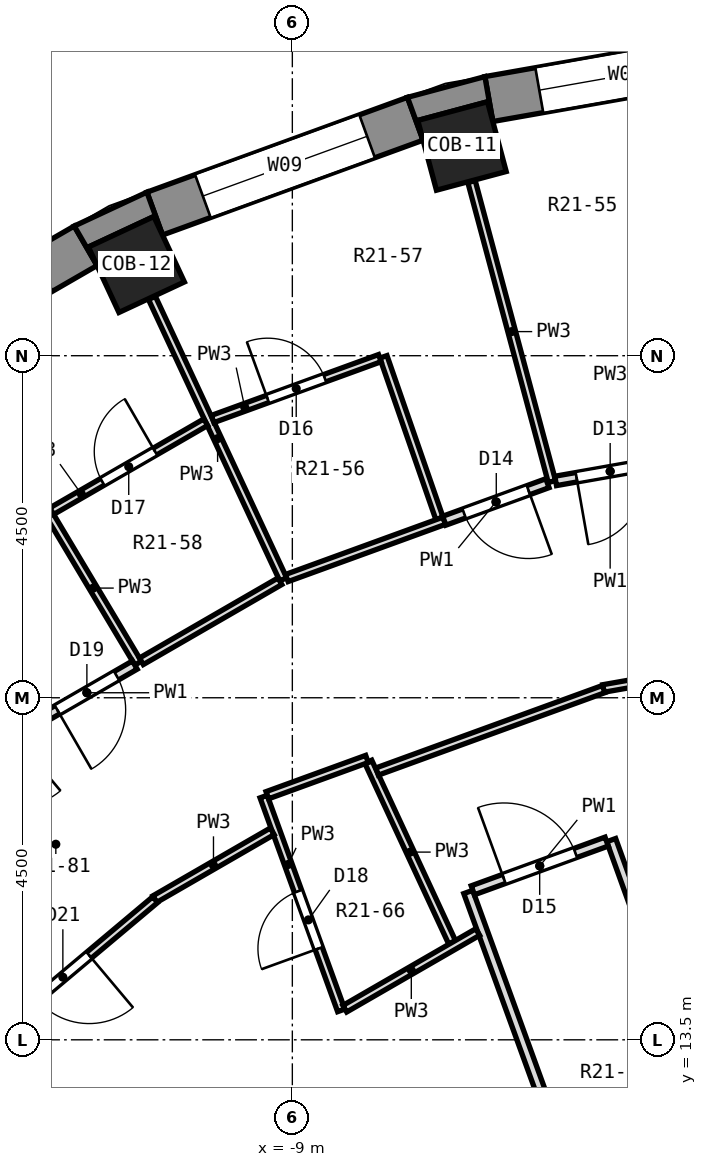
"""IFC4 building model, lengths in metres.
Left out: names, types, materials, properties, quantities, classifications, styles, units other than length and angle.
Written with IfcOpenShell. Run it as: python <this file> out.ifc"""

import sys

from ifc_helpers import new_model, si_unit, direction, frame, frame_2d, origin, origin_2d, place, context, subcontext, project, spatial, polyline, rectangle, outline, extrude, element, fill, save


model = new_model("IFC4")
c1 = context("Model", 3, precision=1e-05, world=origin(), true_north=direction((0.0, 1.0)))
c2 = subcontext(c1, "Body", "Model", "MODEL_VIEW")
j1 = project(units=[si_unit("LENGTHUNIT", "METRE"), si_unit("PLANEANGLEUNIT", "RADIAN")], contexts=[c1])
p1 = place(None, origin())
s1 = spatial("IfcSite", under=j1, at=p1, CompositionType="ELEMENT")
p2 = place(p1, origin())
s2 = spatial("IfcBuilding", under=s1, at=p2, CompositionType="ELEMENT")
p3 = place(p2, frame((0.0, 0.0, 131.5)))
s3 = spatial("IfcBuildingStorey", under=s2, at=p3, CompositionType="ELEMENT", Elevation=131.5)
for number, where, z_axis, x_axis in (
    (1, (-6.768, 25.259, 0.0), (0.0, 0.0, 1.0), (-0.259, 0.966, 0.0)),
    (2, (-11.052, 23.7, 0.0), (0.0, 0.0, 1.0), (-0.423, 0.906, 0.0)),
):
    element("IfcColumn", number, at=place(p3, frame(where, z_axis=z_axis, x_axis=x_axis)), inside=s3, PredefinedType="COLUMN", context=c2, shape_type="SweptSolid", body=[
        extrude(rectangle(XDim=0.95, YDim=0.95, at=origin_2d()), origin(), (0.0, 0.0, 1.0), 3.3),
    ])
p4 = place(p3, frame((-2.822, 26.51, 0.0), z_axis=(0.0, 0.0, 1.0), x_axis=(-0.984803764455, -0.173670796382, 0.0)))
e3 = element("IfcWall", 3, at=p4, inside=s3, PredefinedType="SOLIDWALL", context=c2, shape_type="SweptSolid", body=[
    extrude(rectangle(XDim=3.648, YDim=0.6, at=frame_2d((1.824, 0.0))), origin(), (0.0, 0.0, 1.0), 2.8),
])
p5 = place(p4, frame((0.674, 0.0, 0.9)))
e4 = element("IfcOpeningElement", 4, at=p5, cuts=e3, PredefinedType="OPENING", context=c2, shape_type="SweptSolid", body=[
    extrude(rectangle(XDim=2.3, YDim=1.8, at=frame_2d((1.15, 0.9))), frame((0.0, 0.312, 0.0), z_axis=(0.0, -1.0, 0.0), x_axis=(1.0, 0.0, 0.0)), (0.0, 0.0, 1.0), 0.624),
])
p6 = place(p3, frame((-7.383, 25.617, 0.0), z_axis=(0.0, 0.0, 1.0), x_axis=(-0.939703505393, -0.341990236633, 0.0)))
e5 = element("IfcWall", 5, at=p6, inside=s3, PredefinedType="SOLIDWALL", context=c2, shape_type="SweptSolid", body=[
    extrude(rectangle(XDim=3.648, YDim=0.6, at=frame_2d((1.824, 0.0))), origin(), (0.0, 0.0, 1.0), 2.8),
])
p7 = place(p6, frame((0.674, 0.0, 0.9)))
e6 = element("IfcOpeningElement", 6, at=p7, cuts=e5, PredefinedType="OPENING", context=c2, shape_type="SweptSolid", body=[
    extrude(rectangle(XDim=2.3, YDim=1.8, at=frame_2d((1.15, 0.9))), frame((0.0, 0.312, 0.0), z_axis=(0.0, -1.0, 0.0), x_axis=(1.0, 0.0, 0.0)), (0.0, 0.0, 1.0), 0.624),
])
p8 = place(p3, frame((-11.719, 23.946, 0.0), z_axis=(0.0, 0.0, 1.0), x_axis=(-0.866051847062, -0.499954196102, 0.0)))
e7 = element("IfcWall", 7, at=p8, inside=s3, PredefinedType="SOLIDWALL", context=c2, shape_type="SweptSolid", body=[
    extrude(rectangle(XDim=3.648, YDim=0.6, at=frame_2d((1.824, 0.0))), origin(), (0.0, 0.0, 1.0), 2.8),
])
p9 = place(p8, frame((0.674, 0.0, 0.9)))
e8 = element("IfcOpeningElement", 8, at=p9, cuts=e7, PredefinedType="OPENING", context=c2, shape_type="SweptSolid", body=[
    extrude(rectangle(XDim=2.3, YDim=1.8, at=frame_2d((1.15, 0.9))), frame((0.0, 0.312, 0.0), z_axis=(0.0, -1.0, 0.0), x_axis=(1.0, 0.0, 0.0)), (0.0, 0.0, 1.0), 0.624),
])
p10 = place(p3, origin())
e9 = element("IfcWall", 9, at=p10, inside=s3, PredefinedType="SOLIDWALL", context=c2, shape_type="SweptSolid", body=[
    extrude(outline(polyline([(-6.467, 26.172), (-7.486, 25.899), (-7.28, 25.335), (-7.35, 25.595), (-6.432, 25.841), (-6.363, 25.581), (-6.467, 26.172)])), origin(), (0.0, 0.0, 1.0), 2.8),
])
p11 = place(p3, origin())
e10 = element("IfcWall", 10, at=p11, inside=s3, PredefinedType="SOLIDWALL", context=c2, shape_type="SweptSolid", body=[
    extrude(outline(polyline([(-10.913, 24.651), (-11.869, 24.206), (-11.569, 23.686), (-11.683, 23.93), (-10.822, 24.331), (-10.708, 24.087), (-10.913, 24.651)])), origin(), (0.0, 0.0, 1.0), 2.8),
])
p12 = place(p3, frame((-6.642, 24.791, 0.0), z_axis=(0.0, 0.0, 1.0), x_axis=(0.258796817064, -0.965931782, 0.0)))
e11 = element("IfcWall", 11, at=p12, inside=s3, PredefinedType="PARTITIONING", context=c2, shape_type="SweptSolid", body=[
    extrude(rectangle(XDim=4.086, YDim=0.1, at=frame_2d((2.043, 0.0))), origin(), (0.0, 0.0, 1.0), 2.8),
])
p13 = place(p3, frame((-7.802, 22.485, 0.0), z_axis=(0.0, 0.0, 1.0), x_axis=(0.327758868129, -0.944761411343, 0.0)))
e12 = element("IfcWall", 12, at=p13, inside=s3, PredefinedType="PARTITIONING", context=c2, shape_type="SweptSolid", body=[
    extrude(rectangle(XDim=2.25, YDim=0.1, at=frame_2d((1.125, 0.0))), origin(), (0.0, 0.0, 1.0), 2.8),
])
p14 = place(p3, frame((-4.805, 16.127, 0.0), z_axis=(0.0, 0.0, 1.0), x_axis=(0.339327115449, -0.940668437188, 0.0)))
e13 = element("IfcWall", 13, at=p14, inside=s3, PredefinedType="PARTITIONING", context=c2, shape_type="SweptSolid", body=[
    extrude(rectangle(XDim=5.804, YDim=0.125, at=frame_2d((2.902, 0.0))), origin(), (0.0, 0.0, 1.0), 2.8),
])
p15 = place(p3, frame((-9.378, 16.7, 0.0), z_axis=(0.0, 0.0, 1.0), x_axis=(0.341009323841, -0.940059913545, 0.0)))
e14 = element("IfcWall", 14, at=p15, inside=s3, PredefinedType="PARTITIONING", context=c2, shape_type="SweptSolid", body=[
    extrude(rectangle(XDim=2.993, YDim=0.1, at=frame_2d((1.496, 0.0))), origin(), (0.0, 0.0, 1.0), 2.8),
])
p16 = place(p15, frame((1.326, 0.0, 0.0)))
e15 = element("IfcOpeningElement", 15, at=p16, cuts=e14, PredefinedType="OPENING", context=c2, shape_type="SweptSolid", body=[
    extrude(rectangle(XDim=0.8, YDim=2.1, at=frame_2d((0.4, 1.05))), frame((0.0, 0.062, 0.0), z_axis=(0.0, -1.0, 0.0), x_axis=(1.0, 0.0, 0.0)), (0.0, 0.0, 1.0), 0.124),
])
p17 = place(p3, frame((-6.686, 15.445, 0.0), z_axis=(0.0, 0.0, 1.0), x_axis=(0.341435936204, -0.939905049177, 0.0)))
e16 = element("IfcWall", 16, at=p17, inside=s3, PredefinedType="PARTITIONING", context=c2, shape_type="SweptSolid", body=[
    extrude(rectangle(XDim=5.745, YDim=0.125, at=frame_2d((2.872, 0.0))), origin(), (0.0, 0.0, 1.0), 2.8),
])
p18 = place(p3, frame((-8.001, 17.158, 0.0), z_axis=(0.0, 0.0, 1.0), x_axis=(0.420966177441, -0.907076334964, 0.0)))
e17 = element("IfcWall", 17, at=p18, inside=s3, PredefinedType="PARTITIONING", context=c2, shape_type="SweptSolid", body=[
    extrude(rectangle(XDim=2.62, YDim=0.1, at=frame_2d((1.31, 0.0))), origin(), (0.0, 0.0, 1.0), 2.8),
])
p19 = place(p3, frame((-10.847, 23.26, 0.0), z_axis=(0.0, 0.0, 1.0), x_axis=(0.422784035137, -0.906230467173, 0.0)))
e18 = element("IfcWall", 18, at=p19, inside=s3, PredefinedType="PARTITIONING", context=c2, shape_type="SweptSolid", body=[
    extrude(rectangle(XDim=4.085, YDim=0.1, at=frame_2d((2.042, 0.0))), origin(), (0.0, 0.0, 1.0), 2.8),
])
p20 = place(p3, frame((-12.209, 20.43, 0.0), z_axis=(0.0, 0.0, 1.0), x_axis=(0.512902991174, -0.858446574718, 0.0)))
e19 = element("IfcWall", 19, at=p20, inside=s3, PredefinedType="PARTITIONING", context=c2, shape_type="SweptSolid", body=[
    extrude(rectangle(XDim=2.301, YDim=0.1, at=frame_2d((1.15, 0.0))), origin(), (0.0, 0.0, 1.0), 2.8),
])
p21 = place(p3, frame((-13.237, 13.237, 0.0), z_axis=(0.0, 0.0, 1.0), x_axis=(0.707106781187, -0.707106781187, 0.0)))
e20 = element("IfcWall", 20, at=p21, inside=s3, PredefinedType="PARTITIONING", context=c2, shape_type="SweptSolid", body=[
    extrude(rectangle(XDim=7.615, YDim=0.125, at=frame_2d((3.807, 0.0))), origin(), (0.0, 0.0, 1.0), 2.8),
])
p22 = place(p3, frame((-4.908, 18.122, 0.0), z_axis=(0.0, 0.0, 1.0), x_axis=(0.984801579175, 0.1736831876, 0.0)))
e21 = element("IfcWall", 21, at=p22, inside=s3, PredefinedType="PARTITIONING", context=c2, shape_type="SweptSolid", body=[
    extrude(rectangle(XDim=3.272, YDim=0.1, at=frame_2d((1.636, 0.0))), origin(), (0.0, 0.0, 1.0), 2.8),
])
p23 = place(p3, frame((-5.536, 20.853, 0.0), z_axis=(0.0, 0.0, 1.0), x_axis=(0.984862774054, 0.173335848233, 0.0)))
e22 = element("IfcWall", 22, at=p23, inside=s3, PredefinedType="PARTITIONING", context=c2, shape_type="SweptSolid", body=[
    extrude(rectangle(XDim=1.456, YDim=0.125, at=frame_2d((0.728, 0.0))), origin(), (0.0, 0.0, 1.0), 2.8),
])
p24 = place(p23, frame((0.278, 0.0, 0.0)))
e23 = element("IfcOpeningElement", 23, at=p24, cuts=e22, PredefinedType="OPENING", context=c2, shape_type="SweptSolid", body=[
    extrude(rectangle(XDim=0.9, YDim=2.1, at=frame_2d((0.45, 1.05))), frame((0.0, 0.074, 0.0), z_axis=(0.0, -1.0, 0.0), x_axis=(1.0, 0.0, 0.0)), (0.0, 0.0, 1.0), 0.149),
])
p25 = place(p3, frame((-6.625, 15.467, 0.0), z_axis=(0.0, 0.0, 1.0), x_axis=(0.939717302556, 0.341952323105, 0.0)))
e24 = element("IfcWall", 24, at=p25, inside=s3, PredefinedType="PARTITIONING", context=c2, shape_type="SweptSolid", body=[
    extrude(rectangle(XDim=1.874, YDim=0.125, at=frame_2d((0.937, 0.0))), origin(), (0.0, 0.0, 1.0), 2.8),
])
p26 = place(p25, frame((0.436, 0.0, 0.0)))
e25 = element("IfcOpeningElement", 25, at=p26, cuts=e24, PredefinedType="OPENING", context=c2, shape_type="SweptSolid", body=[
    extrude(rectangle(XDim=1.0, YDim=2.1, at=frame_2d((0.5, 1.05))), frame((0.0, 0.074, 0.0), z_axis=(0.0, -1.0, 0.0), x_axis=(1.0, 0.0, 0.0)), (0.0, 0.0, 1.0), 0.149),
])
p27 = place(p3, frame((-7.885, 17.029, 0.0), z_axis=(0.0, 0.0, 1.0), x_axis=(0.939658489008, 0.342113905059, 0.0)))
e26 = element("IfcWall", 26, at=p27, inside=s3, PredefinedType="PARTITIONING", context=c2, shape_type="SweptSolid", body=[
    extrude(rectangle(XDim=3.171, YDim=0.1, at=frame_2d((1.586, 0.0))), origin(), (0.0, 0.0, 1.0), 2.8),
])
p28 = place(p3, frame((-9.329, 16.718, 0.0), z_axis=(0.0, 0.0, 1.0), x_axis=(0.939665632091, 0.342094285054, 0.0)))
e27 = element("IfcWall", 27, at=p28, inside=s3, PredefinedType="PARTITIONING", context=c2, shape_type="SweptSolid", body=[
    extrude(rectangle(XDim=1.395, YDim=0.1, at=frame_2d((0.698, 0.0))), origin(), (0.0, 0.0, 1.0), 2.8),
])
p29 = place(p3, frame((-9.073, 19.575, 0.0), z_axis=(0.0, 0.0, 1.0), x_axis=(0.939728749343, 0.341920864613, 0.0)))
e28 = element("IfcWall", 28, at=p29, inside=s3, PredefinedType="PARTITIONING", context=c2, shape_type="SweptSolid", body=[
    extrude(rectangle(XDim=2.205, YDim=0.1, at=frame_2d((1.103, 0.0))), origin(), (0.0, 0.0, 1.0), 2.8),
])
p30 = place(p3, frame((-7.001, 20.329, 0.0), z_axis=(0.0, 0.0, 1.0), x_axis=(0.939763804893, 0.341824503237, 0.0)))
e29 = element("IfcWall", 29, at=p30, inside=s3, PredefinedType="PARTITIONING", context=c2, shape_type="SweptSolid", body=[
    extrude(rectangle(XDim=1.444, YDim=0.125, at=frame_2d((0.722, 0.0))), origin(), (0.0, 0.0, 1.0), 2.8),
])
p31 = place(p30, frame((0.278, 0.0, 0.0)))
e30 = element("IfcOpeningElement", 30, at=p31, cuts=e29, PredefinedType="OPENING", context=c2, shape_type="SweptSolid", body=[
    extrude(rectangle(XDim=0.9, YDim=2.1, at=frame_2d((0.45, 1.05))), frame((0.0, 0.074, 0.0), z_axis=(0.0, -1.0, 0.0), x_axis=(1.0, 0.0, 0.0)), (0.0, 0.0, 1.0), 0.149),
])
p32 = place(p3, frame((-10.049, 21.667, 0.0), z_axis=(0.0, 0.0, 1.0), x_axis=(0.939662448837, 0.342103028699, 0.0)))
e31 = element("IfcWall", 31, at=p32, inside=s3, PredefinedType="PARTITIONING", context=c2, shape_type="SweptSolid", body=[
    extrude(rectangle(XDim=2.342, YDim=0.1, at=frame_2d((1.171, 0.0))), origin(), (0.0, 0.0, 1.0), 2.8),
])
p33 = place(p32, frame((0.771, 0.0, 0.0)))
e32 = element("IfcOpeningElement", 32, at=p33, cuts=e31, PredefinedType="OPENING", context=c2, shape_type="SweptSolid", body=[
    extrude(rectangle(XDim=0.8, YDim=2.1, at=frame_2d((0.4, 1.05))), frame((0.0, 0.062, 0.0), z_axis=(0.0, -1.0, 0.0), x_axis=(1.0, 0.0, 0.0)), (0.0, 0.0, 1.0), 0.124),
])
p34 = place(p3, frame((-8.31, 13.909, 0.0), z_axis=(0.0, 0.0, 1.0), x_axis=(0.866137275136, 0.499806183056, 0.0)))
e33 = element("IfcWall", 33, at=p34, inside=s3, PredefinedType="PARTITIONING", context=c2, shape_type="SweptSolid", body=[
    extrude(rectangle(XDim=2.019, YDim=0.1, at=frame_2d((1.01, 0.0))), origin(), (0.0, 0.0, 1.0), 2.8),
])
p35 = place(p3, frame((-10.81, 15.351, 0.0), z_axis=(0.0, 0.0, 1.0), x_axis=(0.866037519928, 0.499979013637, 0.0)))
e34 = element("IfcWall", 34, at=p35, inside=s3, PredefinedType="PARTITIONING", context=c2, shape_type="SweptSolid", body=[
    extrude(rectangle(XDim=1.785, YDim=0.1, at=frame_2d((0.892, 0.0))), origin(), (0.0, 0.0, 1.0), 2.8),
])
p36 = place(p3, frame((-10.986, 18.48, 0.0), z_axis=(0.0, 0.0, 1.0), x_axis=(0.865841622723, 0.50031818312, 0.0)))
e35 = element("IfcWall", 35, at=p36, inside=s3, PredefinedType="PARTITIONING", context=c2, shape_type="SweptSolid", body=[
    extrude(rectangle(XDim=2.105, YDim=0.1, at=frame_2d((1.052, 0.0))), origin(), (0.0, 0.0, 1.0), 2.8),
])
p37 = place(p3, frame((-12.334, 17.702, 0.0), z_axis=(0.0, 0.0, 1.0), x_axis=(0.866110229381, 0.499853048967, 0.0)))
e36 = element("IfcWall", 36, at=p37, inside=s3, PredefinedType="PARTITIONING", context=c2, shape_type="SweptSolid", body=[
    extrude(rectangle(XDim=1.457, YDim=0.125, at=frame_2d((0.728, 0.0))), origin(), (0.0, 0.0, 1.0), 2.8),
])
p38 = place(p37, frame((0.278, 0.0, 0.0)))
e37 = element("IfcOpeningElement", 37, at=p38, cuts=e36, PredefinedType="OPENING", context=c2, shape_type="SweptSolid", body=[
    extrude(rectangle(XDim=0.9, YDim=2.1, at=frame_2d((0.45, 1.05))), frame((0.0, 0.074, 0.0), z_axis=(0.0, -1.0, 0.0), x_axis=(1.0, 0.0, 0.0)), (0.0, 0.0, 1.0), 0.149),
])
p39 = place(p3, frame((-12.166, 20.455, 0.0), z_axis=(0.0, 0.0, 1.0), x_axis=(0.866025730634, 0.499999433879, 0.0)))
e38 = element("IfcWall", 38, at=p39, inside=s3, PredefinedType="PARTITIONING", context=c2, shape_type="SweptSolid", body=[
    extrude(rectangle(XDim=2.34, YDim=0.1, at=frame_2d((1.17, 0.0))), origin(), (0.0, 0.0, 1.0), 2.8),
])
p40 = place(p39, frame((0.77, 0.0, 0.0)))
e39 = element("IfcOpeningElement", 39, at=p40, cuts=e38, PredefinedType="OPENING", context=c2, shape_type="SweptSolid", body=[
    extrude(rectangle(XDim=0.8, YDim=2.1, at=frame_2d((0.4, 1.05))), frame((0.0, 0.062, 0.0), z_axis=(0.0, -1.0, 0.0), x_axis=(1.0, 0.0, 0.0)), (0.0, 0.0, 1.0), 0.124),
])
p41 = place(p3, frame((-13.311, 13.239, 0.0), z_axis=(0.0, 0.0, 1.0), x_axis=(0.76586207823, 0.643004881109, 0.0)))
e40 = element("IfcWall", 40, at=p41, inside=s3, PredefinedType="PARTITIONING", context=c2, shape_type="SweptSolid", body=[
    extrude(rectangle(XDim=3.273, YDim=0.1, at=frame_2d((1.636, 0.0))), origin(), (0.0, 0.0, 1.0), 2.8),
])
p42 = place(p41, frame((1.237, 0.0, 0.0)))
e41 = element("IfcOpeningElement", 41, at=p42, cuts=e40, PredefinedType="OPENING", context=c2, shape_type="SweptSolid", body=[
    extrude(rectangle(XDim=0.9, YDim=2.1, at=frame_2d((0.45, 1.05))), frame((0.0, 0.062, 0.0), z_axis=(0.0, -1.0, 0.0), x_axis=(1.0, 0.0, 0.0)), (0.0, 0.0, 1.0), 0.124),
])
p43 = place(p5, origin())
e42 = element("IfcWindow", 42, at=p43, inside=s3, PartitioningType="SINGLE_PANEL", PredefinedType="WINDOW", context=c2, shape_type="SweptSolid", body=[
    extrude(rectangle(XDim=2.3, YDim=1.8, at=frame_2d((1.15, 0.9))), frame((0.0, 0.18, 0.0), z_axis=(0.0, -1.0, 0.0), x_axis=(1.0, 0.0, 0.0)), (0.0, 0.0, 1.0), 0.06),
])
fill(e4, e42)
p44 = place(p7, origin())
e43 = element("IfcWindow", 43, at=p44, inside=s3, PartitioningType="SINGLE_PANEL", PredefinedType="WINDOW", context=c2, shape_type="SweptSolid", body=[
    extrude(rectangle(XDim=2.3, YDim=1.8, at=frame_2d((1.15, 0.9))), frame((0.0, 0.18, 0.0), z_axis=(0.0, -1.0, 0.0), x_axis=(1.0, 0.0, 0.0)), (0.0, 0.0, 1.0), 0.06),
])
fill(e6, e43)
p45 = place(p24, frame((0.9, 0.0, 0.0), z_axis=(0.0, 0.0, 1.0), x_axis=(-1.0, 0.0, 0.0)))
e44 = element("IfcDoor", 44, at=p45, inside=s3, OperationType="SINGLE_SWING_RIGHT", PredefinedType="DOOR", context=c2, shape_type="SweptSolid", body=[
    extrude(rectangle(XDim=0.9, YDim=2.1, at=frame_2d((0.45, 1.05))), frame((0.0, 0.025, 0.0), z_axis=(0.0, -1.0, 0.0), x_axis=(1.0, 0.0, 0.0)), (0.0, 0.0, 1.0), 0.05),
])
fill(e23, e44)
p46 = place(p31, frame((0.9, 0.0, 0.0), z_axis=(0.0, 0.0, 1.0), x_axis=(-1.0, 0.0, 0.0)))
e45 = element("IfcDoor", 45, at=p46, inside=s3, OperationType="SINGLE_SWING_LEFT", PredefinedType="DOOR", context=c2, shape_type="SweptSolid", body=[
    extrude(rectangle(XDim=0.9, YDim=2.1, at=frame_2d((0.45, 1.05))), frame((0.0, 0.025, 0.0), z_axis=(0.0, -1.0, 0.0), x_axis=(1.0, 0.0, 0.0)), (0.0, 0.0, 1.0), 0.05),
])
fill(e30, e45)
p47 = place(p26, origin())
e46 = element("IfcDoor", 46, at=p47, inside=s3, OperationType="SINGLE_SWING_LEFT", PredefinedType="DOOR", context=c2, shape_type="SweptSolid", body=[
    extrude(rectangle(XDim=1.0, YDim=2.1, at=frame_2d((0.5, 1.05))), frame((0.0, 0.025, 0.0), z_axis=(0.0, -1.0, 0.0), x_axis=(1.0, 0.0, 0.0)), (0.0, 0.0, 1.0), 0.05),
])
fill(e25, e46)
p48 = place(p33, origin())
e47 = element("IfcDoor", 47, at=p48, inside=s3, OperationType="SINGLE_SWING_LEFT", PredefinedType="DOOR", context=c2, shape_type="SweptSolid", body=[
    extrude(rectangle(XDim=0.8, YDim=2.1, at=frame_2d((0.4, 1.05))), frame((0.0, 0.025, 0.0), z_axis=(0.0, -1.0, 0.0), x_axis=(1.0, 0.0, 0.0)), (0.0, 0.0, 1.0), 0.05),
])
fill(e32, e47)
p49 = place(p40, origin())
e48 = element("IfcDoor", 48, at=p49, inside=s3, OperationType="SINGLE_SWING_RIGHT", PredefinedType="DOOR", context=c2, shape_type="SweptSolid", body=[
    extrude(rectangle(XDim=0.8, YDim=2.1, at=frame_2d((0.4, 1.05))), frame((0.0, 0.025, 0.0), z_axis=(0.0, -1.0, 0.0), x_axis=(1.0, 0.0, 0.0)), (0.0, 0.0, 1.0), 0.05),
])
fill(e39, e48)
p50 = place(p16, frame((0.8, 0.0, 0.0), z_axis=(0.0, 0.0, 1.0), x_axis=(-1.0, 0.0, 0.0)))
e49 = element("IfcDoor", 49, at=p50, inside=s3, OperationType="SINGLE_SWING_LEFT", PredefinedType="DOOR", context=c2, shape_type="SweptSolid", body=[
    extrude(rectangle(XDim=0.8, YDim=2.1, at=frame_2d((0.4, 1.05))), frame((0.0, 0.025, 0.0), z_axis=(0.0, -1.0, 0.0), x_axis=(1.0, 0.0, 0.0)), (0.0, 0.0, 1.0), 0.05),
])
fill(e15, e49)
p51 = place(p38, frame((0.9, 0.0, 0.0), z_axis=(0.0, 0.0, 1.0), x_axis=(-1.0, 0.0, 0.0)))
e50 = element("IfcDoor", 50, at=p51, inside=s3, OperationType="SINGLE_SWING_RIGHT", PredefinedType="DOOR", context=c2, shape_type="SweptSolid", body=[
    extrude(rectangle(XDim=0.9, YDim=2.1, at=frame_2d((0.45, 1.05))), frame((0.0, 0.025, 0.0), z_axis=(0.0, -1.0, 0.0), x_axis=(1.0, 0.0, 0.0)), (0.0, 0.0, 1.0), 0.05),
])
fill(e37, e50)
p52 = place(p42, frame((0.9, 0.0, 0.0), z_axis=(0.0, 0.0, 1.0), x_axis=(-1.0, 0.0, 0.0)))
e51 = element("IfcDoor", 51, at=p52, inside=s3, OperationType="SINGLE_SWING_LEFT", PredefinedType="DOOR", context=c2, shape_type="SweptSolid", body=[
    extrude(rectangle(XDim=0.9, YDim=2.1, at=frame_2d((0.45, 1.05))), frame((0.0, 0.025, 0.0), z_axis=(0.0, -1.0, 0.0), x_axis=(1.0, 0.0, 0.0)), (0.0, 0.0, 1.0), 0.05),
])
fill(e41, e51)
save(model, sys.argv[1])
